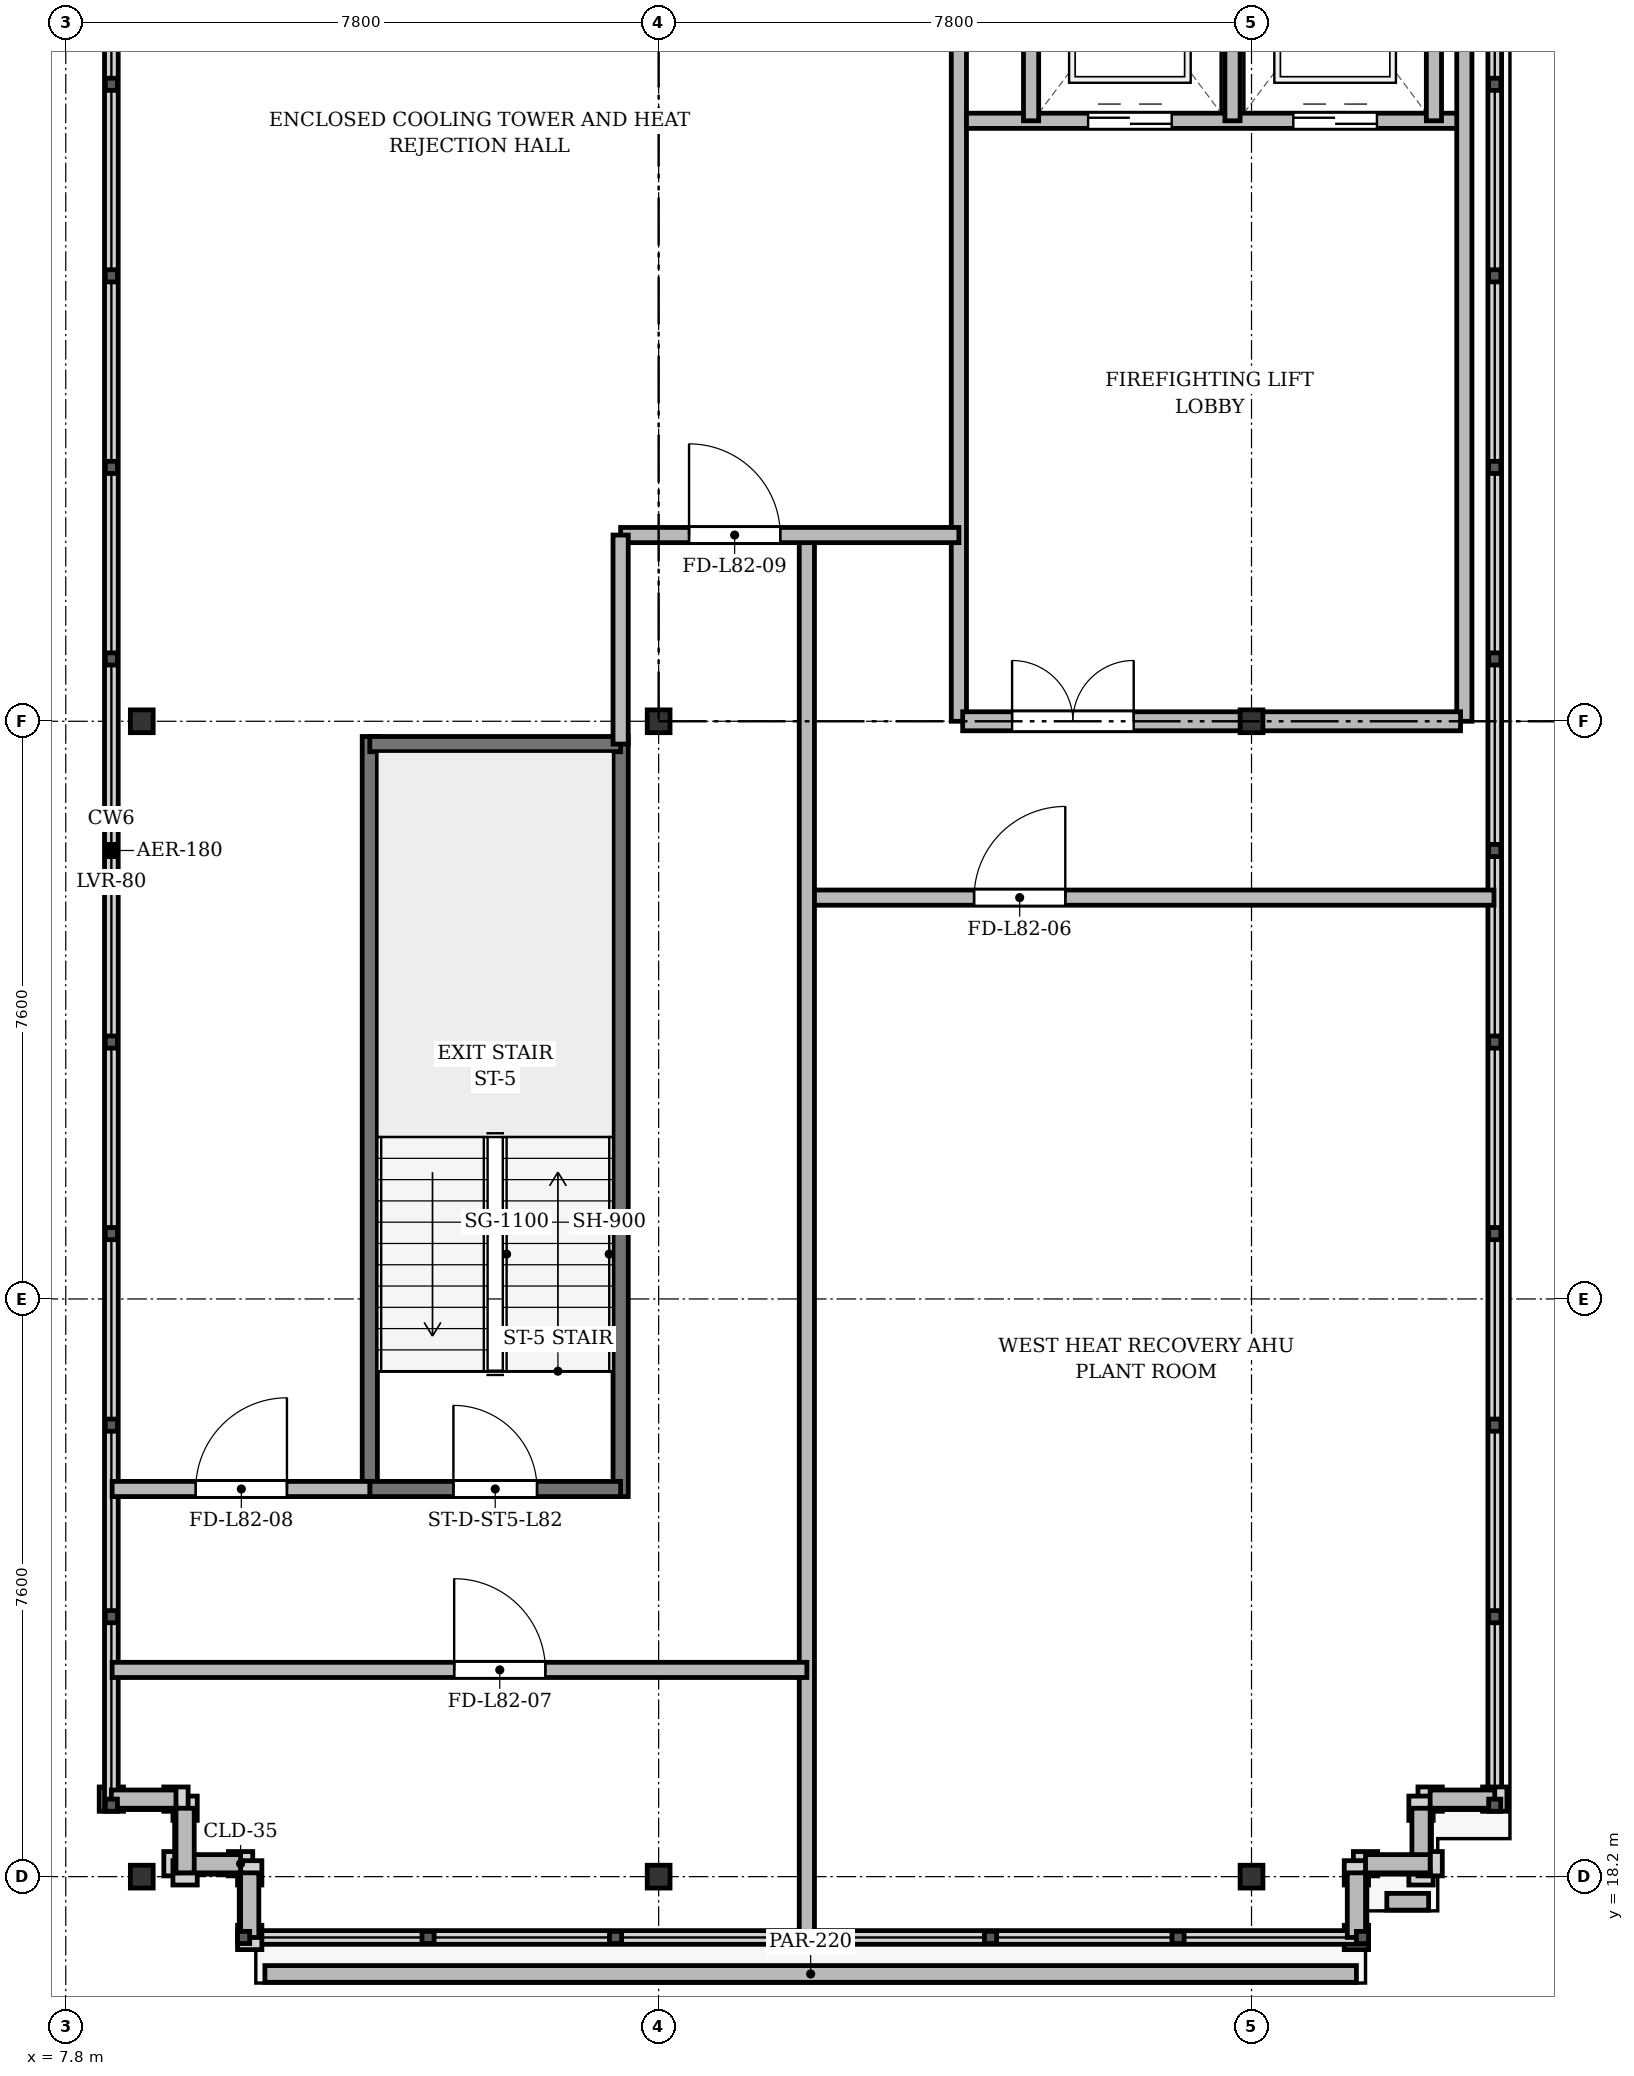
"""IFC4 building model, lengths in metres.
Left out: names, types, materials, properties, quantities, classifications, styles, units other than length and angle.
Written with IfcOpenShell. Run it as: python <this file> out.ifc"""

import sys

from ifc_helpers import new_model, si_unit, direction, frame, frame_2d, origin, origin_2d, place, context, subcontext, project, spatial, rectangle, i_section, extrude, source, transform, mapped, element, fill, save


model = new_model("IFC4")
c1 = context("Model", 3, precision=1e-05, world=origin(), true_north=direction((0.0, 1.0)))
c2 = subcontext(c1, "Body", "Model", "MODEL_VIEW")
j1 = project(units=[si_unit("LENGTHUNIT", "METRE"), si_unit("PLANEANGLEUNIT", "RADIAN")], contexts=[c1])
p1 = place(None, origin())
s1 = spatial("IfcSite", under=j1, at=p1, CompositionType="ELEMENT")
p2 = place(p1, origin())
s2 = spatial("IfcBuilding", under=s1, at=p2, CompositionType="ELEMENT")
p3 = place(p2, frame((0.0, 0.0, 316.7)))
s3 = spatial("IfcBuildingStorey", under=s2, at=p3, CompositionType="ELEMENT", Elevation=316.7)
m1 = source(origin(), c2, "Body", "SweptSolid", [
    extrude(i_section(OverallWidth=0.3, OverallDepth=0.3, WebThickness=0.015, FlangeThickness=0.024, at=origin_2d()), origin(), (0.0, 0.0, 1.0), 4.2),
])
for number, where, z_axis, x_axis in (
    (1, (8.8, 18.2, 0.0), (0.0, 0.0, 1.0), (1.0, 0.0, 0.0)),
    (2, (8.8, 33.4, 0.0), (0.0, 0.0, 1.0), (1.0, 0.0, 0.0)),
    (3, (15.6, 18.2, 0.0), (0.0, 0.0, 1.0), (1.0, 0.0, 0.0)),
    (4, (15.6, 33.4, 0.0), (0.0, 0.0, 1.0), (1.0, 0.0, 0.0)),
    (5, (23.4, 18.2, 0.0), (0.0, 0.0, 1.0), (1.0, 0.0, 0.0)),
    (6, (23.4, 33.4, 0.0), (0.0, 0.0, 1.0), (1.0, 0.0, 0.0)),
):
    element("IfcColumn", number, at=place(p3, frame(where, z_axis=z_axis, x_axis=x_axis)), inside=s3, PredefinedType="COLUMN", context=c2, shape_type="MappedRepresentation", body=[
        mapped(m1, transform((0.0, 0.0, 0.0), x_axis=(1.0, 0.0, 0.0), y_axis=(0.0, 1.0, 0.0), z_axis=(0.0, 0.0, 1.0), scale=1.0)),
    ])
for number, where, z_axis, x_axis in (
    (7, (10.1, 18.37, 0.0), (0.0, 0.0, 1.0), (-1.0, 0.0, 0.0)),
    (8, (9.37, 18.25, 0.0), (0.0, 0.0, 1.0), (0.0, 1.0, 0.0)),
    (9, (9.25, 19.22, 0.0), (0.0, 0.0, 1.0), (-1.0, 0.0, 0.0)),
):
    element("IfcWall", number, at=place(p3, frame(where, z_axis=z_axis, x_axis=x_axis)), inside=s3, PredefinedType="SOLIDWALL", context=c2, shape_type="SweptSolid", body=[
        extrude(rectangle(XDim=0.85, YDim=0.24, at=frame_2d((0.425, 0.0))), origin(), (0.0, 0.0, 1.0), 3.41),
    ])
p4 = place(p3, frame((26.6, 19.22, 0.0), z_axis=(0.0, 0.0, 1.0), x_axis=(-1.0, 0.0, 0.0)))
e10 = element("IfcWall", 10, at=p4, inside=s3, PredefinedType="SOLIDWALL", context=c2, shape_type="SweptSolid", body=[
    extrude(rectangle(XDim=0.85, YDim=0.24, at=frame_2d((0.425, 0.0))), origin(), (0.0, 0.0, 1.0), 3.91),
])
for number, where, z_axis, x_axis in (
    (11, (25.63, 19.1, 0.0), (0.0, 0.0, 1.0), (0.0, -1.0, 0.0)),
    (12, (25.75, 18.37, 0.0), (0.0, 0.0, 1.0), (-1.0, 0.0, 0.0)),
    (13, (24.78, 18.25, 0.0), (0.0, 0.0, 1.0), (0.0, -1.0, 0.0)),
    (14, (10.22, 17.4, 0.0), (0.0, 0.0, 1.0), (0.0, 1.0, 0.0)),
):
    element("IfcWall", number, at=place(p3, frame(where, z_axis=z_axis, x_axis=x_axis)), inside=s3, PredefinedType="SOLIDWALL", context=c2, shape_type="SweptSolid", body=[
        extrude(rectangle(XDim=0.85, YDim=0.24, at=frame_2d((0.425, 0.0))), origin(), (0.0, 0.0, 1.0), 3.41),
    ])
p5 = place(p3, frame((25.73, 17.87, 0.0), z_axis=(0.0, 0.0, 1.0), x_axis=(-1.0, 0.0, 0.0)))
e15 = element("IfcWall", 15, at=p5, inside=s3, PredefinedType="PARAPET", context=c2, shape_type="SweptSolid", body=[
    extrude(rectangle(XDim=0.55, YDim=0.22, at=frame_2d((0.275, 0.0))), origin(), (0.0, 0.0, 1.0), 1.08),
])
p6 = place(p3, frame((24.78, 16.92, 0.0), z_axis=(0.0, 0.0, 1.0), x_axis=(-1.0, 0.0, 0.0)))
e16 = element("IfcWall", 16, at=p6, inside=s3, PredefinedType="PARAPET", context=c2, shape_type="SweptSolid", body=[
    extrude(rectangle(XDim=14.36, YDim=0.22, at=frame_2d((7.18, 0.0))), origin(), (0.0, 0.0, 1.0), 1.08),
])
for number, where, z_axis, x_axis in (
    (17, (11.8, 23.2, 0.0), (0.0, 0.0, 1.0), (0.0, 1.0, 0.0)),
    (18, (15.1, 23.2, 0.0), (0.0, 0.0, 1.0), (0.0, 1.0, 0.0)),
):
    element("IfcWall", number, at=place(p3, frame(where, z_axis=z_axis, x_axis=x_axis)), inside=s3, PredefinedType="SHEAR", context=c2, shape_type="SweptSolid", body=[
        extrude(rectangle(XDim=10.0, YDim=0.2, at=frame_2d((5.0, 0.0))), origin(), (0.0, 0.0, 1.0), 3.91),
    ])
p7 = place(p3, frame((11.8, 33.1, 0.0), z_axis=(0.0, 0.0, 1.0), x_axis=(1.0, 0.0, 0.0)))
e19 = element("IfcWall", 19, at=p7, inside=s3, PredefinedType="SHEAR", context=c2, shape_type="SweptSolid", body=[
    extrude(rectangle(XDim=3.3, YDim=0.2, at=frame_2d((1.65, 0.0))), origin(), (0.0, 0.0, 1.0), 3.91),
])
p8 = place(p3, frame((11.8, 23.3, 0.0), z_axis=(0.0, 0.0, 1.0), x_axis=(1.0, 0.0, 0.0)))
e20 = element("IfcWall", 20, at=p8, inside=s3, PredefinedType="SHEAR", context=c2, shape_type="SweptSolid", body=[
    extrude(rectangle(XDim=3.3, YDim=0.2, at=frame_2d((1.65, 0.0))), origin(), (0.0, 0.0, 1.0), 3.91),
])
p9 = place(p8, frame((1.1, 0.0, 0.0)))
e21 = element("IfcOpeningElement", 21, at=p9, cuts=e20, PredefinedType="OPENING", context=c2, shape_type="SweptSolid", body=[
    extrude(rectangle(XDim=1.1, YDim=2.15, at=frame_2d((0.55, 1.075))), frame((0.0, 0.11, 0.0), z_axis=(0.0, -1.0, 0.0), x_axis=(1.0, 0.0, 0.0)), (0.0, 0.0, 1.0), 0.22),
])
p10 = place(p3, frame((19.55, 33.4, 0.0), z_axis=(0.0, 0.0, 1.0), x_axis=(0.0, 1.0, 0.0)))
e22 = element("IfcWall", 22, at=p10, inside=s3, PredefinedType="PARTITIONING", context=c2, shape_type="SweptSolid", body=[
    extrude(rectangle(XDim=11.3, YDim=0.2, at=frame_2d((5.65, 0.0))), origin(), (0.0, 0.0, 1.0), 3.41),
])
p11 = place(p3, frame((19.65, 41.3, 0.0), z_axis=(0.0, 0.0, 1.0), x_axis=(1.0, 0.0, 0.0)))
e23 = element("IfcWall", 23, at=p11, inside=s3, PredefinedType="SOLIDWALL", context=c2, shape_type="SweptSolid", body=[
    extrude(rectangle(XDim=6.5, YDim=0.2, at=frame_2d((3.25, 0.0))), origin(), (0.0, 0.0, 1.0), 3.91),
])
p12 = place(p11, frame((1.6, 0.0, 0.0)))
e24 = element("IfcOpeningElement", 24, at=p12, cuts=e23, PredefinedType="OPENING", context=c2, shape_type="SweptSolid", body=[
    extrude(rectangle(XDim=1.1, YDim=2.15, at=frame_2d((0.55, 1.075))), frame((0.0, 0.11, 0.0), z_axis=(0.0, -1.0, 0.0), x_axis=(1.0, 0.0, 0.0)), (0.0, 0.0, 1.0), 0.22),
])
p13 = place(p11, frame((4.3, 0.0, 0.0)))
e25 = element("IfcOpeningElement", 25, at=p13, cuts=e23, PredefinedType="OPENING", context=c2, shape_type="SweptSolid", body=[
    extrude(rectangle(XDim=1.1, YDim=2.15, at=frame_2d((0.55, 1.075))), frame((0.0, 0.11, 0.0), z_axis=(0.0, -1.0, 0.0), x_axis=(1.0, 0.0, 0.0)), (0.0, 0.0, 1.0), 0.22),
])
for number, where, z_axis, x_axis in (
    (26, (20.5, 41.3, 0.0), (0.0, 0.0, 1.0), (0.0, 1.0, 0.0)),
    (27, (23.15, 41.3, 0.0), (0.0, 0.0, 1.0), (0.0, 1.0, 0.0)),
):
    element("IfcWall", number, at=place(p3, frame(where, z_axis=z_axis, x_axis=x_axis)), inside=s3, PredefinedType="SOLIDWALL", context=c2, shape_type="SweptSolid", body=[
        extrude(rectangle(XDim=3.4, YDim=0.2, at=frame_2d((1.7, 0.0))), origin(), (0.0, 0.0, 1.0), 3.91),
    ])
p14 = place(p3, frame((25.8, 41.3, 0.0), z_axis=(0.0, 0.0, 1.0), x_axis=(0.0, 1.0, 0.0)))
e28 = element("IfcWall", 28, at=p14, inside=s3, PredefinedType="SOLIDWALL", context=c2, shape_type="SweptSolid", body=[
    extrude(rectangle(XDim=2.86, YDim=0.2, at=frame_2d((1.43, 0.0))), origin(), (0.0, 0.0, 1.0), 3.91),
])
p15 = place(p3, frame((26.2, 33.4, 0.0), z_axis=(0.0, 0.0, 1.0), x_axis=(0.0, 1.0, 0.0)))
e29 = element("IfcWall", 29, at=p15, inside=s3, PredefinedType="SOLIDWALL", context=c2, shape_type="SweptSolid", body=[
    extrude(rectangle(XDim=10.76, YDim=0.2, at=frame_2d((5.38, 0.0))), origin(), (0.0, 0.0, 1.0), 3.41),
])
p16 = place(p3, frame((19.6, 33.4, 0.0), z_axis=(0.0, 0.0, 1.0), x_axis=(1.0, 0.0, 0.0)))
e30 = element("IfcWall", 30, at=p16, inside=s3, PredefinedType="PARTITIONING", context=c2, shape_type="SweptSolid", body=[
    extrude(rectangle(XDim=6.55, YDim=0.25, at=frame_2d((3.275, 0.0))), origin(), (0.0, 0.0, 1.0), 3.41),
])
p17 = place(p16, frame((0.65, 0.0, 0.0)))
e31 = element("IfcOpeningElement", 31, at=p17, cuts=e30, PredefinedType="OPENING", context=c2, shape_type="SweptSolid", body=[
    extrude(rectangle(XDim=1.6, YDim=2.2, at=frame_2d((0.8, 1.1))), frame((0.0, 0.135, 0.0), z_axis=(0.0, -1.0, 0.0), x_axis=(1.0, 0.0, 0.0)), (0.0, 0.0, 1.0), 0.27),
])
p18 = place(p3, frame((17.55, 31.08, 0.0), z_axis=(0.0, 0.0, 1.0), x_axis=(1.0, 0.0, 0.0)))
e32 = element("IfcWall", 32, at=p18, inside=s3, PredefinedType="PARTITIONING", context=c2, shape_type="SweptSolid", body=[
    extrude(rectangle(XDim=9.04, YDim=0.2, at=frame_2d((4.52, 0.0))), origin(), (0.0, 0.0, 1.0), 3.41),
])
p19 = place(p18, frame((2.2, 0.0, 0.0)))
e33 = element("IfcOpeningElement", 33, at=p19, cuts=e32, PredefinedType="OPENING", context=c2, shape_type="SweptSolid", body=[
    extrude(rectangle(XDim=1.2, YDim=2.15, at=frame_2d((0.6, 1.075))), frame((0.0, 0.11, 0.0), z_axis=(0.0, -1.0, 0.0), x_axis=(1.0, 0.0, 0.0)), (0.0, 0.0, 1.0), 0.22),
])
p20 = place(p3, frame((17.55, 17.41, 0.0), z_axis=(0.0, 0.0, 1.0), x_axis=(0.0, 1.0, 0.0)))
e34 = element("IfcWall", 34, at=p20, inside=s3, PredefinedType="PARTITIONING", context=c2, shape_type="SweptSolid", body=[
    extrude(rectangle(XDim=18.44, YDim=0.2, at=frame_2d((9.22, 0.0))), origin(), (0.0, 0.0, 1.0), 3.41),
])
p21 = place(p3, frame((8.41, 20.92, 0.0), z_axis=(0.0, 0.0, 1.0), x_axis=(1.0, 0.0, 0.0)))
e35 = element("IfcWall", 35, at=p21, inside=s3, PredefinedType="PARTITIONING", context=c2, shape_type="SweptSolid", body=[
    extrude(rectangle(XDim=9.14, YDim=0.2, at=frame_2d((4.57, 0.0))), origin(), (0.0, 0.0, 1.0), 3.41),
])
p22 = place(p21, frame((4.5, 0.0, 0.0)))
e36 = element("IfcOpeningElement", 36, at=p22, cuts=e35, PredefinedType="OPENING", context=c2, shape_type="SweptSolid", body=[
    extrude(rectangle(XDim=1.2, YDim=2.15, at=frame_2d((0.6, 1.075))), frame((0.0, 0.11, 0.0), z_axis=(0.0, -1.0, 0.0), x_axis=(1.0, 0.0, 0.0)), (0.0, 0.0, 1.0), 0.22),
])
p23 = place(p3, frame((8.41, 23.3, 0.0), z_axis=(0.0, 0.0, 1.0), x_axis=(1.0, 0.0, 0.0)))
e37 = element("IfcWall", 37, at=p23, inside=s3, PredefinedType="PARTITIONING", context=c2, shape_type="SweptSolid", body=[
    extrude(rectangle(XDim=3.39, YDim=0.2, at=frame_2d((1.695, 0.0))), origin(), (0.0, 0.0, 1.0), 3.41),
])
p24 = place(p23, frame((1.1, 0.0, 0.0)))
e38 = element("IfcOpeningElement", 38, at=p24, cuts=e37, PredefinedType="OPENING", context=c2, shape_type="SweptSolid", body=[
    extrude(rectangle(XDim=1.2, YDim=2.15, at=frame_2d((0.6, 1.075))), frame((0.0, 0.11, 0.0), z_axis=(0.0, -1.0, 0.0), x_axis=(1.0, 0.0, 0.0)), (0.0, 0.0, 1.0), 0.22),
])
p25 = place(p3, frame((15.1, 35.85, 0.0), z_axis=(0.0, 0.0, 1.0), x_axis=(1.0, 0.0, 0.0)))
e39 = element("IfcWall", 39, at=p25, inside=s3, PredefinedType="PARTITIONING", context=c2, shape_type="SweptSolid", body=[
    extrude(rectangle(XDim=4.45, YDim=0.2, at=frame_2d((2.225, 0.0))), origin(), (0.0, 0.0, 1.0), 3.41),
])
p26 = place(p25, frame((0.9, 0.0, 0.0)))
e40 = element("IfcOpeningElement", 40, at=p26, cuts=e39, PredefinedType="OPENING", context=c2, shape_type="SweptSolid", body=[
    extrude(rectangle(XDim=1.2, YDim=2.15, at=frame_2d((0.6, 1.075))), frame((0.0, 0.11, 0.0), z_axis=(0.0, -1.0, 0.0), x_axis=(1.0, 0.0, 0.0)), (0.0, 0.0, 1.0), 0.22),
])
p27 = place(p3, frame((15.1, 33.1, 0.0), z_axis=(0.0, 0.0, 1.0), x_axis=(0.0, 1.0, 0.0)))
e41 = element("IfcWall", 41, at=p27, inside=s3, PredefinedType="PARTITIONING", context=c2, shape_type="SweptSolid", body=[
    extrude(rectangle(XDim=2.75, YDim=0.2, at=frame_2d((1.375, 0.0))), origin(), (0.0, 0.0, 1.0), 3.41),
])
m2 = source(origin(), c2, "Body", "SweptSolid", [
    extrude(rectangle(XDim=1.1, YDim=2.15, at=frame_2d((0.55, 1.075))), frame((0.0, 0.025, 0.0), z_axis=(0.0, -1.0, 0.0), x_axis=(1.0, 0.0, 0.0)), (0.0, 0.0, 1.0), 0.05),
])
p28 = place(p9, origin())
e42 = element("IfcDoor", 42, at=p28, inside=s3, OperationType="SINGLE_SWING_LEFT", PredefinedType="DOOR", context=c2, shape_type="MappedRepresentation", body=[
    mapped(m2, transform((0.0, 0.0, 0.0), x_axis=(1.0, 0.0, 0.0), y_axis=(0.0, 1.0, 0.0), z_axis=(0.0, 0.0, 1.0), scale=1.0)),
])
fill(e21, e42)
p29 = place(p12, origin())
e43 = element("IfcDoor", 43, at=p29, inside=s3, OperationType="DOUBLE_DOOR_SLIDING", PredefinedType="DOOR", context=c2, shape_type="MappedRepresentation", body=[
    mapped(m2, transform((0.0, 0.0, 0.0), x_axis=(1.0, 0.0, 0.0), y_axis=(0.0, 1.0, 0.0), z_axis=(0.0, 0.0, 1.0), scale=1.0)),
])
fill(e24, e43)
p30 = place(p13, origin())
e44 = element("IfcDoor", 44, at=p30, inside=s3, OperationType="DOUBLE_DOOR_SLIDING", PredefinedType="DOOR", context=c2, shape_type="MappedRepresentation", body=[
    mapped(m2, transform((0.0, 0.0, 0.0), x_axis=(1.0, 0.0, 0.0), y_axis=(0.0, 1.0, 0.0), z_axis=(0.0, 0.0, 1.0), scale=1.0)),
])
fill(e25, e44)
m3 = source(origin(), c2, "Body", "SweptSolid", [
    extrude(rectangle(XDim=1.6, YDim=2.2, at=frame_2d((0.8, 1.1))), frame((0.0, 0.025, 0.0), z_axis=(0.0, -1.0, 0.0), x_axis=(1.0, 0.0, 0.0)), (0.0, 0.0, 1.0), 0.05),
])
p31 = place(p17, origin())
e45 = element("IfcDoor", 45, at=p31, inside=s3, OperationType="DOUBLE_DOOR_SINGLE_SWING", PredefinedType="DOOR", context=c2, shape_type="MappedRepresentation", body=[
    mapped(m3, transform((0.0, 0.0, 0.0), x_axis=(1.0, 0.0, 0.0), y_axis=(0.0, 1.0, 0.0), z_axis=(0.0, 0.0, 1.0), scale=1.0)),
])
fill(e31, e45)
m4 = source(origin(), c2, "Body", "SweptSolid", [
    extrude(rectangle(XDim=1.2, YDim=2.15, at=frame_2d((0.6, 1.075))), frame((0.0, 0.025, 0.0), z_axis=(0.0, -1.0, 0.0), x_axis=(1.0, 0.0, 0.0)), (0.0, 0.0, 1.0), 0.05),
])
p32 = place(p19, origin())
e46 = element("IfcDoor", 46, at=p32, inside=s3, OperationType="SINGLE_SWING_RIGHT", PredefinedType="DOOR", context=c2, shape_type="MappedRepresentation", body=[
    mapped(m4, transform((0.0, 0.0, 0.0), x_axis=(1.0, 0.0, 0.0), y_axis=(0.0, 1.0, 0.0), z_axis=(0.0, 0.0, 1.0), scale=1.0)),
])
fill(e33, e46)
p33 = place(p22, origin())
e47 = element("IfcDoor", 47, at=p33, inside=s3, OperationType="SINGLE_SWING_LEFT", PredefinedType="DOOR", context=c2, shape_type="MappedRepresentation", body=[
    mapped(m4, transform((0.0, 0.0, 0.0), x_axis=(1.0, 0.0, 0.0), y_axis=(0.0, 1.0, 0.0), z_axis=(0.0, 0.0, 1.0), scale=1.0)),
])
fill(e36, e47)
p34 = place(p24, origin())
e48 = element("IfcDoor", 48, at=p34, inside=s3, OperationType="SINGLE_SWING_RIGHT", PredefinedType="DOOR", context=c2, shape_type="MappedRepresentation", body=[
    mapped(m4, transform((0.0, 0.0, 0.0), x_axis=(1.0, 0.0, 0.0), y_axis=(0.0, 1.0, 0.0), z_axis=(0.0, 0.0, 1.0), scale=1.0)),
])
fill(e38, e48)
p35 = place(p26, origin())
e49 = element("IfcDoor", 49, at=p35, inside=s3, OperationType="SINGLE_SWING_LEFT", PredefinedType="DOOR", context=c2, shape_type="MappedRepresentation", body=[
    mapped(m4, transform((0.0, 0.0, 0.0), x_axis=(1.0, 0.0, 0.0), y_axis=(0.0, 1.0, 0.0), z_axis=(0.0, 0.0, 1.0), scale=1.0)),
])
fill(e40, e49)
save(model, sys.argv[1])
